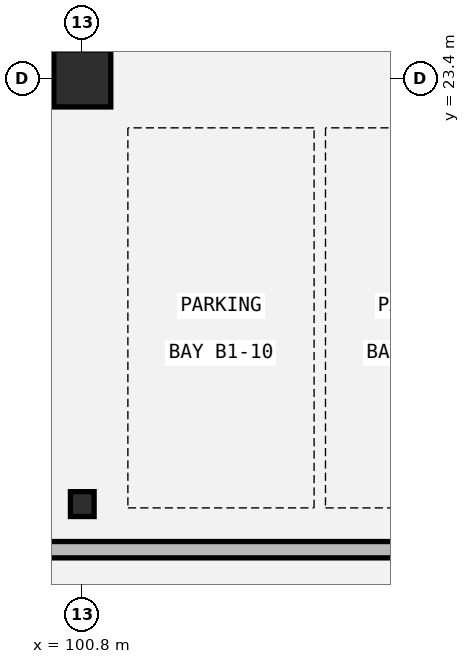
"""IFC4 building model, lengths in metres.
Left out: names, types, materials, properties, quantities, classifications, styles, units other than length and angle.
Written with IfcOpenShell. Run it as: python <this file> out.ifc"""

import sys

from ifc_helpers import new_model, si_unit, direction, frame, frame_2d, origin, origin_2d, place, context, subcontext, project, spatial, rectangle, i_section, extrude, element, save


model = new_model("IFC4")
c1 = context("Model", 3, precision=1e-05, world=origin(), true_north=direction((0.0, 1.0)))
c2 = subcontext(c1, "Body", "Model", "MODEL_VIEW")
j1 = project(units=[si_unit("LENGTHUNIT", "METRE"), si_unit("PLANEANGLEUNIT", "RADIAN")], contexts=[c1])
p1 = place(None, origin())
s1 = spatial("IfcSite", under=j1, at=p1, CompositionType="ELEMENT")
p2 = place(p1, origin())
s2 = spatial("IfcBuilding", under=s1, at=p2, CompositionType="ELEMENT")
p3 = place(p2, frame((0.0, 0.0, -4.5)))
s3 = spatial("IfcBuildingStorey", under=s2, at=p3, CompositionType="ELEMENT", Elevation=-4.5)
p4 = place(p3, frame((100.8, 17.8, 0.0), z_axis=(0.0, 0.0, 1.0), x_axis=(1.0, 0.0, 0.0)))
e1 = element("IfcColumn", 1, at=p4, inside=s3, PredefinedType="COLUMN", context=c2, shape_type="SweptSolid", body=[
    extrude(i_section(OverallWidth=0.311, OverallDepth=0.327, WebThickness=0.016, FlangeThickness=0.025, FilletRadius=0.015, at=origin_2d()), origin(), (0.0, 0.0, 1.0), 4.5),
])
p5 = place(p3, frame((100.8, 23.4, 0.0), z_axis=(0.0, 0.0, 1.0), x_axis=(1.0, 0.0, 0.0)))
e2 = element("IfcColumn", 2, at=p5, inside=s3, PredefinedType="COLUMN", context=c2, shape_type="SweptSolid", body=[
    extrude(rectangle(XDim=0.75, YDim=0.75, at=origin_2d()), origin(), (0.0, 0.0, 1.0), 4.5),
])
p6 = place(p3, frame((84.0, 17.2, 0.0), z_axis=(0.0, 0.0, 1.0), x_axis=(1.0, 0.0, 0.0)))
e3 = element("IfcWall", 3, at=p6, inside=s3, PredefinedType="STANDARD", context=c2, shape_type="SweptSolid", body=[
    extrude(rectangle(XDim=33.6, YDim=0.215, at=frame_2d((16.8, 0.0))), origin(), (0.0, 0.0, 1.0), 3.625),
])
p7 = place(p6, frame((27.433, 0.0, 0.0)))
e4 = element("IfcOpeningElement", 4, at=p7, cuts=e3, PredefinedType="OPENING", context=c2, shape_type="SweptSolid", body=[
    extrude(rectangle(XDim=1.25, YDim=2.15, at=frame_2d((0.625, 1.075))), frame((0.0, 0.117, 0.0), z_axis=(0.0, -1.0, 0.0), x_axis=(1.0, 0.0, 0.0)), (0.0, 0.0, 1.0), 0.235),
])
save(model, sys.argv[1])
